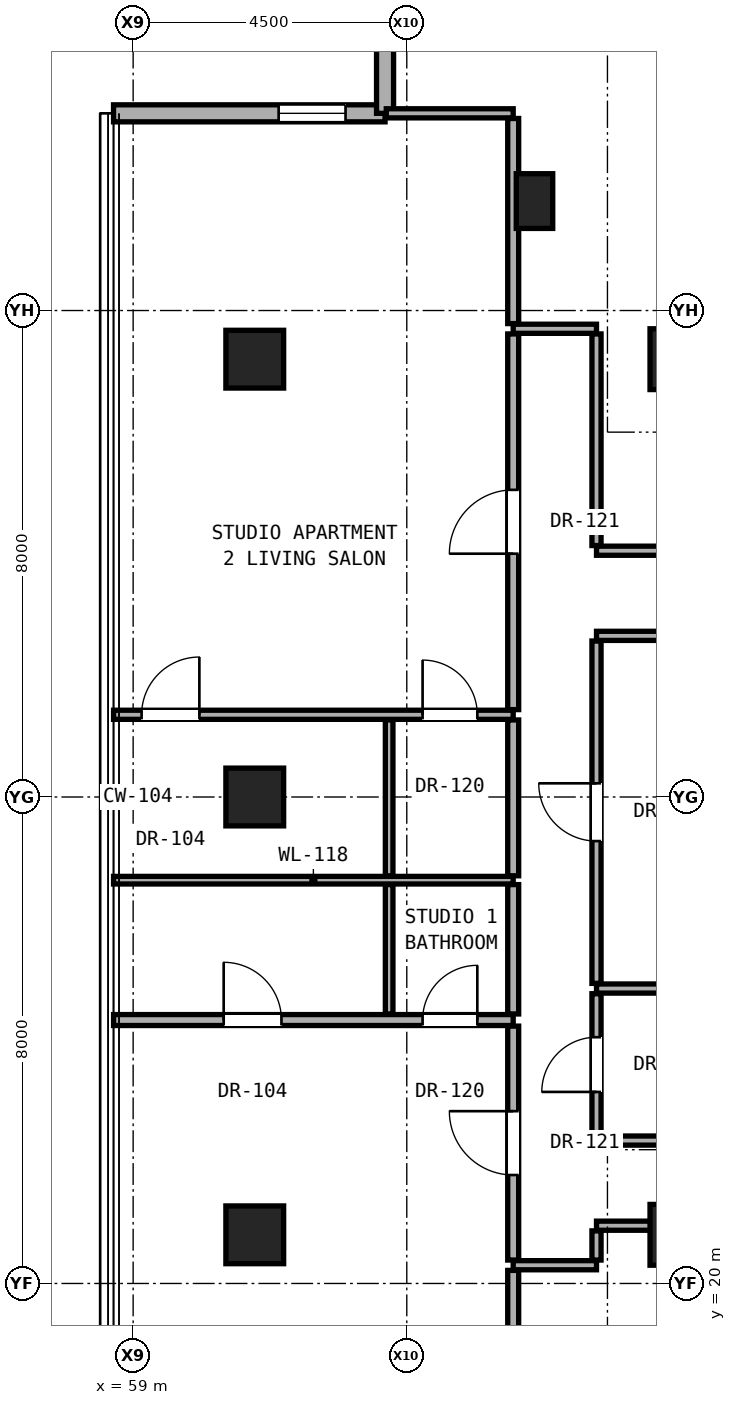
"""IFC4 building model, lengths in metres.
Left out: names, types, materials, properties, quantities, classifications, styles, units other than length and angle.
Written with IfcOpenShell. Run it as: python <this file> out.ifc"""

import sys

from ifc_helpers import new_model, si_unit, direction, frame, frame_2d, origin, origin_2d, place, context, subcontext, project, spatial, rectangle, hollow_rectangle, extrude, element, fill, save


model = new_model("IFC4")
c1 = context("Model", 3, precision=1e-05, world=origin(), true_north=direction((0.0, 1.0)))
c2 = subcontext(c1, "Body", "Model", "MODEL_VIEW")
j1 = project(units=[si_unit("LENGTHUNIT", "METRE"), si_unit("PLANEANGLEUNIT", "RADIAN")], contexts=[c1])
p1 = place(None, origin())
s1 = spatial("IfcSite", under=j1, at=p1, CompositionType="ELEMENT")
p2 = place(p1, origin())
s2 = spatial("IfcBuilding", under=s1, at=p2, CompositionType="ELEMENT")
p3 = place(p2, frame((0.0, 0.0, 170.65)))
s3 = spatial("IfcBuildingStorey", under=s2, at=p3, CompositionType="ELEMENT", Elevation=170.65)
for number, where, z_axis, x_axis in (
    (1, (68.0, 20.8, 0.0), (0.0, 0.0, 1.0), (1.0, 0.0, 0.0)),
    (2, (68.0, 35.2, 0.0), (0.0, 0.0, 1.0), (1.0, 0.0, 0.0)),
):
    element("IfcColumn", number, at=place(p3, frame(where, z_axis=z_axis, x_axis=x_axis)), inside=s3, PredefinedType="COLUMN", context=c2, shape_type="SweptSolid", body=[
        extrude(rectangle(XDim=1.0, YDim=1.0, at=origin_2d()), origin(), (0.0, 0.0, 1.0), 3.25),
    ])
for number, where, z_axis, x_axis in (
    (3, (61.0, 20.8, 0.0), (0.0, 0.0, 1.0), (1.0, 0.0, 0.0)),
    (4, (61.0, 28.0, 0.0), (0.0, 0.0, 1.0), (1.0, 0.0, 0.0)),
    (5, (61.0, 35.2, 0.0), (0.0, 0.0, 1.0), (1.0, 0.0, 0.0)),
):
    element("IfcColumn", number, at=place(p3, frame(where, z_axis=z_axis, x_axis=x_axis)), inside=s3, PredefinedType="COLUMN", context=c2, shape_type="SweptSolid", body=[
        extrude(hollow_rectangle(XDim=0.95, YDim=0.95, WallThickness=0.05, at=origin_2d()), origin(), (0.0, 0.0, 1.0), 3.25),
    ])
p4 = place(p3, frame((65.6, 37.8, 0.0), z_axis=(0.0, 0.0, 1.0), x_axis=(1.0, 0.0, 0.0)))
e6 = element("IfcColumn", 6, at=p4, inside=s3, PredefinedType="PILASTER", context=c2, shape_type="SweptSolid", body=[
    extrude(rectangle(XDim=0.6, YDim=0.9, at=origin_2d()), origin(), (0.0, 0.0, 1.0), 3.25),
])
p5 = place(p3, frame((63.143, 39.243, 0.0), z_axis=(0.0, 0.0, 1.0), x_axis=(-1.0, 0.0, 0.0)))
e7 = element("IfcWall", 7, at=p5, inside=s3, PredefinedType="SOLIDWALL", context=c2, shape_type="SweptSolid", body=[
    extrude(rectangle(XDim=4.465, YDim=0.28, at=frame_2d((2.232, 0.0))), origin(), (0.0, 0.0, 1.0), 3.03),
])
p6 = place(p5, frame((0.65, 0.0, 0.85)))
e8 = element("IfcOpeningElement", 8, at=p6, cuts=e7, PredefinedType="OPENING", context=c2, shape_type="SweptSolid", body=[
    extrude(rectangle(XDim=1.1, YDim=2.0, at=frame_2d((0.55, 1.0))), frame((0.0, 0.15, 0.0), z_axis=(0.0, -1.0, 0.0), x_axis=(1.0, 0.0, 0.0)), (0.0, 0.0, 1.0), 0.3),
])
p7 = place(p3, frame((63.143, 43.708, 0.0), z_axis=(0.0, 0.0, 1.0), x_axis=(0.0, -1.0, 0.0)))
e9 = element("IfcWall", 9, at=p7, inside=s3, PredefinedType="SOLIDWALL", context=c2, shape_type="SweptSolid", body=[
    extrude(rectangle(XDim=4.465, YDim=0.28, at=frame_2d((2.232, 0.0))), origin(), (0.0, 0.0, 1.0), 3.03),
])
p8 = place(p3, frame((65.25, 20.3, 0.0), z_axis=(0.0, 0.0, 1.0), x_axis=(1.0, 0.0, 0.0)))
e10 = element("IfcWall", 10, at=p8, inside=s3, PredefinedType="PARTITIONING", context=c2, shape_type="SweptSolid", body=[
    extrude(rectangle(XDim=1.37, YDim=0.15, at=frame_2d((0.685, 0.0))), origin(), (0.0, 0.0, 1.0), 3.05),
])
p9 = place(p3, frame((66.62, 20.95, 0.0), z_axis=(0.0, 0.0, 1.0), x_axis=(1.0, 0.0, 0.0)))
e11 = element("IfcWall", 11, at=p9, inside=s3, PredefinedType="PARTITIONING", context=c2, shape_type="SweptSolid", body=[
    extrude(rectangle(XDim=1.11, YDim=0.15, at=frame_2d((0.555, 0.0))), origin(), (0.0, 0.0, 1.0), 2.442),
])
p10 = place(p3, frame((66.62, 22.35, 0.0), z_axis=(0.0, 0.0, 1.0), x_axis=(1.0, 0.0, 0.0)))
e12 = element("IfcWall", 12, at=p10, inside=s3, PredefinedType="PARTITIONING", context=c2, shape_type="SweptSolid", body=[
    extrude(rectangle(XDim=10.14, YDim=0.15, at=frame_2d((5.07, 0.0))), origin(), (0.0, 0.0, 1.0), 2.186),
])
p11 = place(p3, frame((58.678, 24.332, 0.0), z_axis=(0.0, 0.0, 1.0), x_axis=(1.0, 0.0, 0.0)))
e13 = element("IfcWall", 13, at=p11, inside=s3, PredefinedType="PARTITIONING", context=c2, shape_type="SweptSolid", body=[
    extrude(rectangle(XDim=6.572, YDim=0.18, at=frame_2d((3.286, 0.0))), origin(), (0.0, 0.0, 1.0), 2.269),
])
p12 = place(p11, frame((1.811, 0.0, 0.0)))
e14 = element("IfcOpeningElement", 14, at=p12, cuts=e13, PredefinedType="OPENING", context=c2, shape_type="SweptSolid", body=[
    extrude(rectangle(XDim=0.95, YDim=2.15, at=frame_2d((0.475, 1.075))), frame((0.0, 0.1, 0.0), z_axis=(0.0, -1.0, 0.0), x_axis=(1.0, 0.0, 0.0)), (0.0, 0.0, 1.0), 0.2),
])
p13 = place(p11, frame((5.082, 0.0, 0.0)))
e15 = element("IfcOpeningElement", 15, at=p13, cuts=e13, PredefinedType="OPENING", context=c2, shape_type="SweptSolid", body=[
    extrude(rectangle(XDim=0.9, YDim=2.1, at=frame_2d((0.45, 1.05))), frame((0.0, 0.1, 0.0), z_axis=(0.0, -1.0, 0.0), x_axis=(1.0, 0.0, 0.0)), (0.0, 0.0, 1.0), 0.2),
])
p14 = place(p3, frame((66.62, 24.85, 0.0), z_axis=(0.0, 0.0, 1.0), x_axis=(1.0, 0.0, 0.0)))
e16 = element("IfcWall", 16, at=p14, inside=s3, PredefinedType="PARTITIONING", context=c2, shape_type="SweptSolid", body=[
    extrude(rectangle(XDim=3.13, YDim=0.15, at=frame_2d((1.565, 0.0))), origin(), (0.0, 0.0, 1.0), 2.186),
])
p15 = place(p3, frame((58.678, 26.632, 0.0), z_axis=(0.0, 0.0, 1.0), x_axis=(1.0, 0.0, 0.0)))
e17 = element("IfcWall", 17, at=p15, inside=s3, PredefinedType="PARTITIONING", context=c2, shape_type="SweptSolid", body=[
    extrude(rectangle(XDim=6.572, YDim=0.125, at=frame_2d((3.286, 0.0))), origin(), (0.0, 0.0, 1.0), 2.269),
])
p16 = place(p3, frame((58.678, 29.352, 0.0), z_axis=(0.0, 0.0, 1.0), x_axis=(1.0, 0.0, 0.0)))
e18 = element("IfcWall", 18, at=p16, inside=s3, PredefinedType="PARTITIONING", context=c2, shape_type="SweptSolid", body=[
    extrude(rectangle(XDim=6.572, YDim=0.15, at=frame_2d((3.286, 0.0))), origin(), (0.0, 0.0, 1.0), 2.269),
])
p17 = place(p16, frame((0.461, 0.0, 0.0)))
e19 = element("IfcOpeningElement", 19, at=p17, cuts=e18, PredefinedType="OPENING", context=c2, shape_type="SweptSolid", body=[
    extrude(rectangle(XDim=0.95, YDim=2.15, at=frame_2d((0.475, 1.075))), frame((0.0, 0.085, 0.0), z_axis=(0.0, -1.0, 0.0), x_axis=(1.0, 0.0, 0.0)), (0.0, 0.0, 1.0), 0.17),
])
p18 = place(p16, frame((5.082, 0.0, 0.0)))
e20 = element("IfcOpeningElement", 20, at=p18, cuts=e18, PredefinedType="OPENING", context=c2, shape_type="SweptSolid", body=[
    extrude(rectangle(XDim=0.9, YDim=2.1, at=frame_2d((0.45, 1.05))), frame((0.0, 0.085, 0.0), z_axis=(0.0, -1.0, 0.0), x_axis=(1.0, 0.0, 0.0)), (0.0, 0.0, 1.0), 0.17),
])
p19 = place(p3, frame((66.62, 30.65, 0.0), z_axis=(0.0, 0.0, 1.0), x_axis=(1.0, 0.0, 0.0)))
e21 = element("IfcWall", 21, at=p19, inside=s3, PredefinedType="PARTITIONING", context=c2, shape_type="SweptSolid", body=[
    extrude(rectangle(XDim=10.14, YDim=0.15, at=frame_2d((5.07, 0.0))), origin(), (0.0, 0.0, 1.0), 2.186),
])
p20 = place(p19, frame((6.14, 0.0, 0.0)))
e22 = element("IfcOpeningElement", 22, at=p20, cuts=e21, PredefinedType="OPENING", context=c2, shape_type="SweptSolid", body=[
    extrude(rectangle(XDim=0.95, YDim=2.15, at=frame_2d((0.475, 1.075))), frame((0.0, 0.085, 0.0), z_axis=(0.0, -1.0, 0.0), x_axis=(1.0, 0.0, 0.0)), (0.0, 0.0, 1.0), 0.17),
])
p21 = place(p3, frame((66.62, 32.05, 0.0), z_axis=(0.0, 0.0, 1.0), x_axis=(1.0, 0.0, 0.0)))
e23 = element("IfcWall", 23, at=p21, inside=s3, PredefinedType="PARTITIONING", context=c2, shape_type="SweptSolid", body=[
    extrude(rectangle(XDim=2.18, YDim=0.15, at=frame_2d((1.09, 0.0))), origin(), (0.0, 0.0, 1.0), 2.186),
])
p22 = place(p3, frame((65.25, 35.7, 0.0), z_axis=(0.0, 0.0, 1.0), x_axis=(1.0, 0.0, 0.0)))
e24 = element("IfcWall", 24, at=p22, inside=s3, PredefinedType="PARTITIONING", context=c2, shape_type="SweptSolid", body=[
    extrude(rectangle(XDim=1.37, YDim=0.15, at=frame_2d((0.685, 0.0))), origin(), (0.0, 0.0, 1.0), 3.05),
])
p23 = place(p3, frame((63.163, 39.243, 0.0), z_axis=(0.0, 0.0, 1.0), x_axis=(1.0, 0.0, 0.0)))
e25 = element("IfcWall", 25, at=p23, inside=s3, PredefinedType="PARTITIONING", context=c2, shape_type="SweptSolid", body=[
    extrude(rectangle(XDim=2.087, YDim=0.15, at=frame_2d((1.044, 0.0))), origin(), (0.0, 0.0, 1.0), 3.05),
])
p24 = place(p3, frame((63.21, 24.432, 0.0), z_axis=(0.0, 0.0, 1.0), x_axis=(0.0, 1.0, 0.0)))
e26 = element("IfcWall", 26, at=p24, inside=s3, PredefinedType="PARTITIONING", context=c2, shape_type="SweptSolid", body=[
    extrude(rectangle(XDim=2.128, YDim=0.125, at=frame_2d((1.064, 0.0))), origin(), (0.0, 0.0, 1.0), 3.05),
])
p25 = place(p3, frame((63.21, 26.705, 0.0), z_axis=(0.0, 0.0, 1.0), x_axis=(0.0, 1.0, 0.0)))
e27 = element("IfcWall", 27, at=p25, inside=s3, PredefinedType="PARTITIONING", context=c2, shape_type="SweptSolid", body=[
    extrude(rectangle(XDim=2.562, YDim=0.125, at=frame_2d((1.281, 0.0))), origin(), (0.0, 0.0, 1.0), 2.346),
])
p26 = place(p3, frame((65.25, 16.857, 0.0), z_axis=(0.0, 0.0, 1.0), x_axis=(0.0, 1.0, 0.0)))
e28 = element("IfcWall", 28, at=p26, inside=s3, PredefinedType="PARTITIONING", context=c2, shape_type="SweptSolid", body=[
    extrude(rectangle(XDim=3.358, YDim=0.18, at=frame_2d((1.679, 0.0))), origin(), (0.0, 0.0, 1.0), 2.493),
])
p27 = place(p3, frame((65.25, 20.385, 0.0), z_axis=(0.0, 0.0, 1.0), x_axis=(0.0, 1.0, 0.0)))
e29 = element("IfcWall", 29, at=p27, inside=s3, PredefinedType="PARTITIONING", context=c2, shape_type="SweptSolid", body=[
    extrude(rectangle(XDim=3.847, YDim=0.18, at=frame_2d((1.923, 0.0))), origin(), (0.0, 0.0, 1.0), 2.442),
])
p28 = place(p27, frame((1.398, 0.0, 0.0)))
e30 = element("IfcOpeningElement", 30, at=p28, cuts=e29, PredefinedType="OPENING", context=c2, shape_type="SweptSolid", body=[
    extrude(rectangle(XDim=1.05, YDim=2.2, at=frame_2d((0.525, 1.1))), frame((0.0, 0.1, 0.0), z_axis=(0.0, -1.0, 0.0), x_axis=(1.0, 0.0, 0.0)), (0.0, 0.0, 1.0), 0.2),
])
p29 = place(p3, frame((65.25, 24.432, 0.0), z_axis=(0.0, 0.0, 1.0), x_axis=(0.0, 1.0, 0.0)))
e31 = element("IfcWall", 31, at=p29, inside=s3, PredefinedType="PARTITIONING", context=c2, shape_type="SweptSolid", body=[
    extrude(rectangle(XDim=2.128, YDim=0.18, at=frame_2d((1.064, 0.0))), origin(), (0.0, 0.0, 1.0), 3.05),
])
p30 = place(p3, frame((65.25, 26.705, 0.0), z_axis=(0.0, 0.0, 1.0), x_axis=(0.0, 1.0, 0.0)))
e32 = element("IfcWall", 32, at=p30, inside=s3, PredefinedType="PARTITIONING", context=c2, shape_type="SweptSolid", body=[
    extrude(rectangle(XDim=2.562, YDim=0.18, at=frame_2d((1.281, 0.0))), origin(), (0.0, 0.0, 1.0), 2.346),
])
p31 = place(p3, frame((65.25, 29.437, 0.0), z_axis=(0.0, 0.0, 1.0), x_axis=(0.0, 1.0, 0.0)))
e33 = element("IfcWall", 33, at=p31, inside=s3, PredefinedType="PARTITIONING", context=c2, shape_type="SweptSolid", body=[
    extrude(rectangle(XDim=6.178, YDim=0.18, at=frame_2d((3.089, 0.0))), origin(), (0.0, 0.0, 1.0), 2.442),
])
p32 = place(p31, frame((2.564, 0.0, 0.0)))
e34 = element("IfcOpeningElement", 34, at=p32, cuts=e33, PredefinedType="OPENING", context=c2, shape_type="SweptSolid", body=[
    extrude(rectangle(XDim=1.05, YDim=2.2, at=frame_2d((0.525, 1.1))), frame((0.0, 0.1, 0.0), z_axis=(0.0, -1.0, 0.0), x_axis=(1.0, 0.0, 0.0)), (0.0, 0.0, 1.0), 0.2),
])
p33 = place(p3, frame((65.25, 35.785, 0.0), z_axis=(0.0, 0.0, 1.0), x_axis=(0.0, 1.0, 0.0)))
e35 = element("IfcWall", 35, at=p33, inside=s3, PredefinedType="PARTITIONING", context=c2, shape_type="SweptSolid", body=[
    extrude(rectangle(XDim=3.373, YDim=0.18, at=frame_2d((1.687, 0.0))), origin(), (0.0, 0.0, 1.0), 2.493),
])
p34 = place(p3, frame((66.62, 20.385, 0.0), z_axis=(0.0, 0.0, 1.0), x_axis=(0.0, 1.0, 0.0)))
e36 = element("IfcWall", 36, at=p34, inside=s3, PredefinedType="PARTITIONING", context=c2, shape_type="SweptSolid", body=[
    extrude(rectangle(XDim=0.48, YDim=0.15, at=frame_2d((0.24, 0.0))), origin(), (0.0, 0.0, 1.0), 2.442),
])
p35 = place(p3, frame((66.62, 22.435, 0.0), z_axis=(0.0, 0.0, 1.0), x_axis=(0.0, 1.0, 0.0)))
e37 = element("IfcWall", 37, at=p35, inside=s3, PredefinedType="PARTITIONING", context=c2, shape_type="SweptSolid", body=[
    extrude(rectangle(XDim=2.33, YDim=0.15, at=frame_2d((1.165, 0.0))), origin(), (0.0, 0.0, 1.0), 3.05),
])
p36 = place(p35, frame((0.715, 0.0, 0.0)))
e38 = element("IfcOpeningElement", 38, at=p36, cuts=e37, PredefinedType="OPENING", context=c2, shape_type="SweptSolid", body=[
    extrude(rectangle(XDim=0.9, YDim=2.1, at=frame_2d((0.45, 1.05))), frame((0.0, 0.085, 0.0), z_axis=(0.0, -1.0, 0.0), x_axis=(1.0, 0.0, 0.0)), (0.0, 0.0, 1.0), 0.17),
])
p37 = place(p3, frame((66.62, 24.935, 0.0), z_axis=(0.0, 0.0, 1.0), x_axis=(0.0, 1.0, 0.0)))
e39 = element("IfcWall", 39, at=p37, inside=s3, PredefinedType="PARTITIONING", context=c2, shape_type="SweptSolid", body=[
    extrude(rectangle(XDim=5.63, YDim=0.15, at=frame_2d((2.815, 0.0))), origin(), (0.0, 0.0, 1.0), 2.346),
])
p38 = place(p37, frame((2.34, 0.0, 0.0)))
e40 = element("IfcOpeningElement", 40, at=p38, cuts=e39, PredefinedType="OPENING", context=c2, shape_type="SweptSolid", body=[
    extrude(rectangle(XDim=0.95, YDim=2.15, at=frame_2d((0.475, 1.075))), frame((0.0, 0.085, 0.0), z_axis=(0.0, -1.0, 0.0), x_axis=(1.0, 0.0, 0.0)), (0.0, 0.0, 1.0), 0.17),
])
p39 = place(p3, frame((66.62, 32.135, 0.0), z_axis=(0.0, 0.0, 1.0), x_axis=(0.0, 1.0, 0.0)))
e41 = element("IfcWall", 41, at=p39, inside=s3, PredefinedType="PARTITIONING", context=c2, shape_type="SweptSolid", body=[
    extrude(rectangle(XDim=3.48, YDim=0.15, at=frame_2d((1.74, 0.0))), origin(), (0.0, 0.0, 1.0), 2.442),
])
p40 = place(p6, origin())
e42 = element("IfcWindow", 42, at=p40, inside=s3, PartitioningType="SINGLE_PANEL", PredefinedType="WINDOW", context=c2, shape_type="SweptSolid", body=[
    extrude(rectangle(XDim=1.1, YDim=2.0, at=frame_2d((0.55, 1.0))), frame((0.0, 0.03, 0.0), z_axis=(0.0, -1.0, 0.0), x_axis=(1.0, 0.0, 0.0)), (0.0, 0.0, 1.0), 0.06),
])
fill(e8, e42)
p41 = place(p36, origin())
e43 = element("IfcDoor", 43, at=p41, inside=s3, OperationType="SINGLE_SWING_LEFT", PredefinedType="DOOR", context=c2, shape_type="SweptSolid", body=[
    extrude(rectangle(XDim=0.9, YDim=2.1, at=frame_2d((0.45, 1.05))), frame((0.0, 0.025, 0.0), z_axis=(0.0, -1.0, 0.0), x_axis=(1.0, 0.0, 0.0)), (0.0, 0.0, 1.0), 0.05),
])
fill(e38, e43)
p42 = place(p28, origin())
e44 = element("IfcDoor", 44, at=p42, inside=s3, OperationType="SINGLE_SWING_RIGHT", PredefinedType="DOOR", context=c2, shape_type="SweptSolid", body=[
    extrude(rectangle(XDim=1.05, YDim=2.2, at=frame_2d((0.525, 1.1))), frame((0.0, 0.025, 0.0), z_axis=(0.0, -1.0, 0.0), x_axis=(1.0, 0.0, 0.0)), (0.0, 0.0, 1.0), 0.05),
])
fill(e30, e44)
p43 = place(p12, origin())
e45 = element("IfcDoor", 45, at=p43, inside=s3, OperationType="SINGLE_SWING_LEFT", PredefinedType="DOOR", context=c2, shape_type="SweptSolid", body=[
    extrude(rectangle(XDim=0.95, YDim=2.15, at=frame_2d((0.475, 1.075))), frame((0.0, 0.025, 0.0), z_axis=(0.0, -1.0, 0.0), x_axis=(1.0, 0.0, 0.0)), (0.0, 0.0, 1.0), 0.05),
])
fill(e14, e45)
p44 = place(p13, origin())
e46 = element("IfcDoor", 46, at=p44, inside=s3, OperationType="SINGLE_SWING_RIGHT", PredefinedType="DOOR", context=c2, shape_type="SweptSolid", body=[
    extrude(rectangle(XDim=0.9, YDim=2.1, at=frame_2d((0.45, 1.05))), frame((0.0, 0.025, 0.0), z_axis=(0.0, -1.0, 0.0), x_axis=(1.0, 0.0, 0.0)), (0.0, 0.0, 1.0), 0.05),
])
fill(e15, e46)
p45 = place(p32, origin())
e47 = element("IfcDoor", 47, at=p45, inside=s3, OperationType="SINGLE_SWING_LEFT", PredefinedType="DOOR", context=c2, shape_type="SweptSolid", body=[
    extrude(rectangle(XDim=1.05, YDim=2.2, at=frame_2d((0.525, 1.1))), frame((0.0, 0.025, 0.0), z_axis=(0.0, -1.0, 0.0), x_axis=(1.0, 0.0, 0.0)), (0.0, 0.0, 1.0), 0.05),
])
fill(e34, e47)
p46 = place(p17, origin())
e48 = element("IfcDoor", 48, at=p46, inside=s3, OperationType="SINGLE_SWING_RIGHT", PredefinedType="DOOR", context=c2, shape_type="SweptSolid", body=[
    extrude(rectangle(XDim=0.95, YDim=2.15, at=frame_2d((0.475, 1.075))), frame((0.0, 0.025, 0.0), z_axis=(0.0, -1.0, 0.0), x_axis=(1.0, 0.0, 0.0)), (0.0, 0.0, 1.0), 0.05),
])
fill(e19, e48)
p47 = place(p18, origin())
e49 = element("IfcDoor", 49, at=p47, inside=s3, OperationType="SINGLE_SWING_LEFT", PredefinedType="DOOR", context=c2, shape_type="SweptSolid", body=[
    extrude(rectangle(XDim=0.9, YDim=2.1, at=frame_2d((0.45, 1.05))), frame((0.0, 0.025, 0.0), z_axis=(0.0, -1.0, 0.0), x_axis=(1.0, 0.0, 0.0)), (0.0, 0.0, 1.0), 0.05),
])
fill(e20, e49)
p48 = place(p38, origin())
e50 = element("IfcDoor", 50, at=p48, inside=s3, OperationType="SINGLE_SWING_RIGHT", PredefinedType="DOOR", context=c2, shape_type="SweptSolid", body=[
    extrude(rectangle(XDim=0.95, YDim=2.15, at=frame_2d((0.475, 1.075))), frame((0.0, 0.025, 0.0), z_axis=(0.0, -1.0, 0.0), x_axis=(1.0, 0.0, 0.0)), (0.0, 0.0, 1.0), 0.05),
])
fill(e40, e50)
save(model, sys.argv[1])
